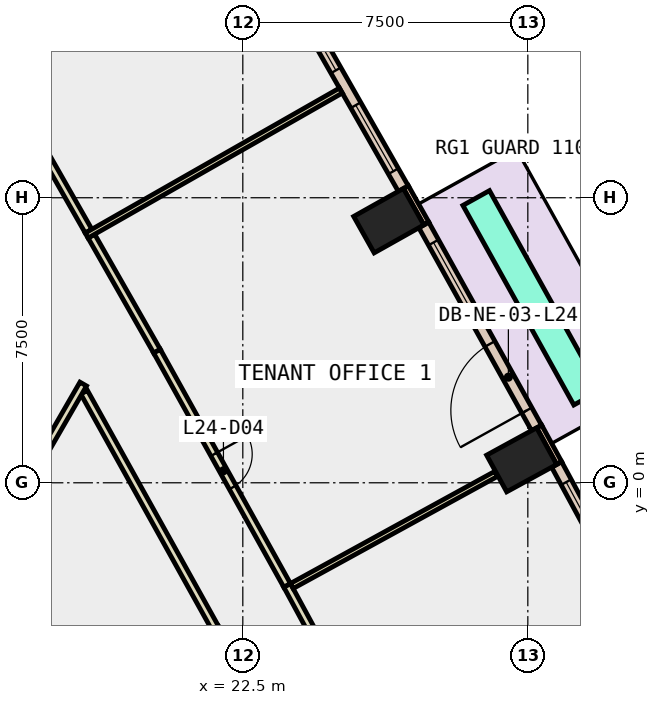
"""IFC4 building model, lengths in metres.
Left out: names, types, materials, properties, quantities, classifications, styles, units other than length and angle.
Written with IfcOpenShell. Run it as: python <this file> out.ifc"""

import sys

from ifc_helpers import new_model, si_unit, direction, frame, frame_2d, origin, origin_2d, place, context, subcontext, project, spatial, rectangle, extrude, element, fill, save


model = new_model("IFC4")
c1 = context("Model", 3, precision=1e-05, world=origin(), true_north=direction((0.0, 1.0)))
c2 = subcontext(c1, "Body", "Model", "MODEL_VIEW")
j1 = project(units=[si_unit("LENGTHUNIT", "METRE"), si_unit("PLANEANGLEUNIT", "RADIAN")], contexts=[c1])
p1 = place(None, origin())
s1 = spatial("IfcSite", under=j1, at=p1, CompositionType="ELEMENT")
p2 = place(p1, origin())
s2 = spatial("IfcBuilding", under=s1, at=p2, CompositionType="ELEMENT")
p3 = place(p2, frame((0.0, 0.0, 111.8)))
s3 = spatial("IfcBuildingStorey", under=s2, at=p3, CompositionType="ELEMENT", Elevation=111.8)
for number, where, z_axis, x_axis in (
    (1, (29.838, 0.604, -0.4), (0.0, 0.0, 1.0), (-0.48, 0.877, 0.0)),
    (2, (26.341, 6.896, -0.4), (0.0, 0.0, 1.0), (-0.49, 0.872, 0.0)),
):
    element("IfcColumn", number, at=place(p3, frame(where, z_axis=z_axis, x_axis=x_axis)), inside=s3, PredefinedType="COLUMN", context=c2, shape_type="SweptSolid", body=[
        extrude(rectangle(XDim=1.1, YDim=1.5, at=origin_2d()), origin(), (0.0, 0.0, 1.0), 4.2),
    ])
p4 = place(p3, frame((30.826, 0.517, 0.0), z_axis=(0.0, 0.0, 1.0), x_axis=(-0.479566870346, 0.877505337229, 0.0)))
e3 = element("IfcWall", 3, at=p4, inside=s3, PredefinedType="STANDARD", context=c2, shape_type="SweptSolid", body=[
    extrude(rectangle(XDim=1.101, YDim=0.15, at=frame_2d((0.55, 0.0))), origin(), (0.0, 0.0, 1.0), 3.8),
])
p5 = place(p3, frame((27.33, 6.821, 0.0), z_axis=(0.0, 0.0, 1.0), x_axis=(-0.490008344094, 0.871717742574, 0.0)))
e4 = element("IfcWall", 4, at=p5, inside=s3, PredefinedType="STANDARD", context=c2, shape_type="SweptSolid", body=[
    extrude(rectangle(XDim=1.1, YDim=0.15, at=frame_2d((0.55, 0.0))), origin(), (0.0, 0.0, 1.0), 3.8),
])
p6 = place(p3, frame((33.667, -4.892, 0.0), z_axis=(0.0, 0.0, 1.0), x_axis=(-0.476097776444, 0.879392351152, 0.0)))
e5 = element("IfcWall", 5, at=p6, inside=s3, PredefinedType="STANDARD", context=c2, shape_type="SweptSolid", body=[
    extrude(rectangle(XDim=6.11, YDim=0.3, at=frame_2d((3.055, 0.0))), origin(), (0.0, 0.0, 1.0), 3.8),
])
p7 = place(p6, frame((0.527, 0.0, 0.9)))
e6 = element("IfcOpeningElement", 6, at=p7, cuts=e5, PredefinedType="OPENING", context=c2, shape_type="SweptSolid", body=[
    extrude(rectangle(XDim=2.0, YDim=2.6, at=frame_2d((1.0, 1.3))), frame((0.0, 0.16, 0.0), z_axis=(0.0, -1.0, 0.0), x_axis=(1.0, 0.0, 0.0)), (0.0, 0.0, 1.0), 0.32),
])
p8 = place(p6, frame((3.582, 0.0, 0.9)))
e7 = element("IfcOpeningElement", 7, at=p8, cuts=e5, PredefinedType="OPENING", context=c2, shape_type="SweptSolid", body=[
    extrude(rectangle(XDim=2.0, YDim=2.6, at=frame_2d((1.0, 1.3))), frame((0.0, 0.16, 0.0), z_axis=(0.0, -1.0, 0.0), x_axis=(1.0, 0.0, 0.0)), (0.0, 0.0, 1.0), 0.32),
])
p9 = place(p3, frame((30.23, 1.444, 0.0), z_axis=(0.0, 0.0, 1.0), x_axis=(-0.485822751649, 0.874057351654, 0.0)))
e8 = element("IfcWall", 8, at=p9, inside=s3, PredefinedType="STANDARD", context=c2, shape_type="SweptSolid", body=[
    extrude(rectangle(XDim=6.109, YDim=0.3, at=frame_2d((3.055, 0.0))), origin(), (0.0, 0.0, 1.0), 3.8),
])
p10 = place(p9, frame((0.527, 0.0, 0.0)))
e9 = element("IfcOpeningElement", 9, at=p10, cuts=e8, PredefinedType="OPENING", context=c2, shape_type="SweptSolid", body=[
    extrude(rectangle(XDim=2.0, YDim=2.4, at=frame_2d((1.0, 1.2))), frame((0.0, 0.16, 0.0), z_axis=(0.0, -1.0, 0.0), x_axis=(1.0, 0.0, 0.0)), (0.0, 0.0, 1.0), 0.32),
])
p11 = place(p9, frame((3.582, 0.0, 0.9)))
e10 = element("IfcOpeningElement", 10, at=p11, cuts=e8, PredefinedType="OPENING", context=c2, shape_type="SweptSolid", body=[
    extrude(rectangle(XDim=2.0, YDim=2.6, at=frame_2d((1.0, 1.3))), frame((0.0, 0.16, 0.0), z_axis=(0.0, -1.0, 0.0), x_axis=(1.0, 0.0, 0.0)), (0.0, 0.0, 1.0), 0.32),
])
p12 = place(p3, frame((26.723, 7.74, 0.0), z_axis=(0.0, 0.0, 1.0), x_axis=(-0.495114366991, 0.868827810098, 0.0)))
e11 = element("IfcWall", 11, at=p12, inside=s3, PredefinedType="STANDARD", context=c2, shape_type="SweptSolid", body=[
    extrude(rectangle(XDim=6.11, YDim=0.3, at=frame_2d((3.055, 0.0))), origin(), (0.0, 0.0, 1.0), 3.8),
])
p13 = place(p12, frame((0.527, 0.0, 0.9)))
e12 = element("IfcOpeningElement", 12, at=p13, cuts=e11, PredefinedType="OPENING", context=c2, shape_type="SweptSolid", body=[
    extrude(rectangle(XDim=2.0, YDim=2.6, at=frame_2d((1.0, 1.3))), frame((0.0, 0.16, 0.0), z_axis=(0.0, -1.0, 0.0), x_axis=(1.0, 0.0, 0.0)), (0.0, 0.0, 1.0), 0.32),
])
p14 = place(p12, frame((3.582, 0.0, 0.9)))
e13 = element("IfcOpeningElement", 13, at=p14, cuts=e11, PredefinedType="OPENING", context=c2, shape_type="SweptSolid", body=[
    extrude(rectangle(XDim=2.0, YDim=2.6, at=frame_2d((1.0, 1.3))), frame((0.0, 0.16, 0.0), z_axis=(0.0, -1.0, 0.0), x_axis=(1.0, 0.0, 0.0)), (0.0, 0.0, 1.0), 0.32),
])
p15 = place(p3, frame((31.56, 2.241, 0.0), z_axis=(0.0, 0.0, 1.0), x_axis=(-0.485794718415, 0.874072932632, 0.0)))
e14 = element("IfcWall", 14, at=p15, inside=s3, PredefinedType="STANDARD", context=c2, shape_type="SweptSolid", body=[
    extrude(rectangle(XDim=6.009, YDim=0.8, at=frame_2d((3.004, 0.0))), origin(), (0.0, 0.0, 1.0), 0.8),
])
p16 = place(p3, frame((21.773, -3.822, 0.0), z_axis=(0.0, 0.0, 1.0), x_axis=(-0.485826874234, 0.874055060206, 0.0)))
e15 = element("IfcWall", 15, at=p16, inside=s3, PredefinedType="PARTITIONING", context=c2, shape_type="SweptSolid", body=[
    extrude(rectangle(XDim=7.099, YDim=0.2, at=frame_2d((3.55, 0.0))), origin(), (0.0, 0.0, 1.0), 3.8),
])
p17 = place(p3, frame((23.666, -2.698, 0.0), z_axis=(0.0, 0.0, 1.0), x_axis=(0.476195741963, -0.879339306148, 0.0)))
e16 = element("IfcWall", 16, at=p17, inside=s3, PredefinedType="PARTITIONING", context=c2, shape_type="SweptSolid", body=[
    extrude(rectangle(XDim=7.199, YDim=0.2, at=frame_2d((3.599, 0.0))), origin(), (0.0, 0.0, 1.0), 3.8),
])
p18 = place(p17, frame((3.099, 0.0, 0.0)))
e17 = element("IfcOpeningElement", 17, at=p18, cuts=e16, PredefinedType="OPENING", context=c2, shape_type="SweptSolid", body=[
    extrude(rectangle(XDim=1.0, YDim=2.1, at=frame_2d((0.5, 1.05))), frame((0.0, 0.11, 0.0), z_axis=(0.0, -1.0, 0.0), x_axis=(1.0, 0.0, 0.0)), (0.0, 0.0, 1.0), 0.22),
])
p19 = place(p3, frame((18.515, 6.491, 0.0), z_axis=(0.0, 0.0, 1.0), x_axis=(0.495309264725, -0.868716715781, 0.0)))
e18 = element("IfcWall", 18, at=p19, inside=s3, PredefinedType="PARTITIONING", context=c2, shape_type="SweptSolid", body=[
    extrude(rectangle(XDim=3.487, YDim=0.2, at=frame_2d((1.743, 0.0))), origin(), (0.0, 0.0, 1.0), 3.8),
])
p20 = place(p3, frame((20.242, 3.462, 0.0), z_axis=(0.0, 0.0, 1.0), x_axis=(0.485742937917, -0.874101709336, 0.0)))
e19 = element("IfcWall", 19, at=p20, inside=s3, PredefinedType="PARTITIONING", context=c2, shape_type="SweptSolid", body=[
    extrude(rectangle(XDim=7.047, YDim=0.2, at=frame_2d((3.523, 0.0))), origin(), (0.0, 0.0, 1.0), 3.8),
])
p21 = place(p20, frame((3.099, 0.0, 0.0)))
e20 = element("IfcOpeningElement", 20, at=p21, cuts=e19, PredefinedType="OPENING", context=c2, shape_type="SweptSolid", body=[
    extrude(rectangle(XDim=1.0, YDim=2.1, at=frame_2d((0.5, 1.05))), frame((0.0, 0.11, 0.0), z_axis=(0.0, -1.0, 0.0), x_axis=(1.0, 0.0, 0.0)), (0.0, 0.0, 1.0), 0.22),
])
p22 = place(p3, frame((16.714, 9.65, 0.0), z_axis=(0.0, 0.0, 1.0), x_axis=(0.495286549488, -0.868729666753, 0.0)))
e21 = element("IfcWall", 21, at=p22, inside=s3, PredefinedType="PARTITIONING", context=c2, shape_type="SweptSolid", body=[
    extrude(rectangle(XDim=3.487, YDim=0.2, at=frame_2d((1.743, 0.0))), origin(), (0.0, 0.0, 1.0), 3.8),
])
p23 = place(p3, frame((18.301, 2.598, 0.0), z_axis=(0.0, 0.0, 1.0), x_axis=(-0.49997732567, -0.866038494419, 0.0)))
e22 = element("IfcWall", 22, at=p23, inside=s3, PredefinedType="PARTITIONING", context=c2, shape_type="SweptSolid", body=[
    extrude(rectangle(XDim=11.0, YDim=0.2, at=frame_2d((5.5, 0.0))), origin(), (0.0, 0.0, 1.0), 3.8),
])
p24 = place(p3, frame((23.789, -2.716, 0.0), z_axis=(0.0, 0.0, 1.0), x_axis=(0.876716532234, 0.481007403382, 0.0)))
e23 = element("IfcWall", 23, at=p24, inside=s3, PredefinedType="PARTITIONING", context=c2, shape_type="SweptSolid", body=[
    extrude(rectangle(XDim=6.131, YDim=0.15, at=frame_2d((3.065, 0.0))), origin(), (0.0, 0.0, 1.0), 3.8),
])
p25 = place(p3, frame((18.391, 6.506, 0.0), z_axis=(0.0, 0.0, 1.0), x_axis=(0.868738258528, 0.495271479261, 0.0)))
e24 = element("IfcWall", 24, at=p25, inside=s3, PredefinedType="PARTITIONING", context=c2, shape_type="SweptSolid", body=[
    extrude(rectangle(XDim=7.701, YDim=0.15, at=frame_2d((3.85, 0.0))), origin(), (0.0, 0.0, 1.0), 3.8),
])
p26 = place(p8, origin())
e25 = element("IfcWindow", 25, at=p26, inside=s3, PartitioningType="SINGLE_PANEL", PredefinedType="WINDOW", context=c2, shape_type="SweptSolid", body=[
    extrude(rectangle(XDim=2.0, YDim=2.6, at=frame_2d((1.0, 1.3))), frame((0.0, 0.03, 0.0), z_axis=(0.0, -1.0, 0.0), x_axis=(1.0, 0.0, 0.0)), (0.0, 0.0, 1.0), 0.06),
])
fill(e7, e25)
p27 = place(p10, origin())
e26 = element("IfcDoor", 26, at=p27, inside=s3, OperationType="SLIDING_TO_LEFT", PredefinedType="DOOR", context=c2, shape_type="SweptSolid", body=[
    extrude(rectangle(XDim=2.0, YDim=2.4, at=frame_2d((1.0, 1.2))), frame((0.0, 0.025, 0.0), z_axis=(0.0, -1.0, 0.0), x_axis=(1.0, 0.0, 0.0)), (0.0, 0.0, 1.0), 0.05),
])
fill(e9, e26)
p28 = place(p11, origin())
e27 = element("IfcWindow", 27, at=p28, inside=s3, PartitioningType="SINGLE_PANEL", PredefinedType="WINDOW", context=c2, shape_type="SweptSolid", body=[
    extrude(rectangle(XDim=2.0, YDim=2.6, at=frame_2d((1.0, 1.3))), frame((0.0, 0.03, 0.0), z_axis=(0.0, -1.0, 0.0), x_axis=(1.0, 0.0, 0.0)), (0.0, 0.0, 1.0), 0.06),
])
fill(e10, e27)
p29 = place(p13, origin())
e28 = element("IfcWindow", 28, at=p29, inside=s3, PartitioningType="SINGLE_PANEL", PredefinedType="WINDOW", context=c2, shape_type="SweptSolid", body=[
    extrude(rectangle(XDim=2.0, YDim=2.6, at=frame_2d((1.0, 1.3))), frame((0.0, 0.03, 0.0), z_axis=(0.0, -1.0, 0.0), x_axis=(1.0, 0.0, 0.0)), (0.0, 0.0, 1.0), 0.06),
])
fill(e12, e28)
p30 = place(p14, origin())
e29 = element("IfcWindow", 29, at=p30, inside=s3, PartitioningType="SINGLE_PANEL", PredefinedType="WINDOW", context=c2, shape_type="SweptSolid", body=[
    extrude(rectangle(XDim=2.0, YDim=2.6, at=frame_2d((1.0, 1.3))), frame((0.0, 0.03, 0.0), z_axis=(0.0, -1.0, 0.0), x_axis=(1.0, 0.0, 0.0)), (0.0, 0.0, 1.0), 0.06),
])
fill(e13, e29)
p31 = place(p21, origin())
e30 = element("IfcDoor", 30, at=p31, inside=s3, OperationType="SINGLE_SWING_LEFT", PredefinedType="DOOR", context=c2, shape_type="SweptSolid", body=[
    extrude(rectangle(XDim=1.0, YDim=2.1, at=frame_2d((0.5, 1.05))), frame((0.0, 0.025, 0.0), z_axis=(0.0, -1.0, 0.0), x_axis=(1.0, 0.0, 0.0)), (0.0, 0.0, 1.0), 0.05),
])
fill(e20, e30)
save(model, sys.argv[1])
